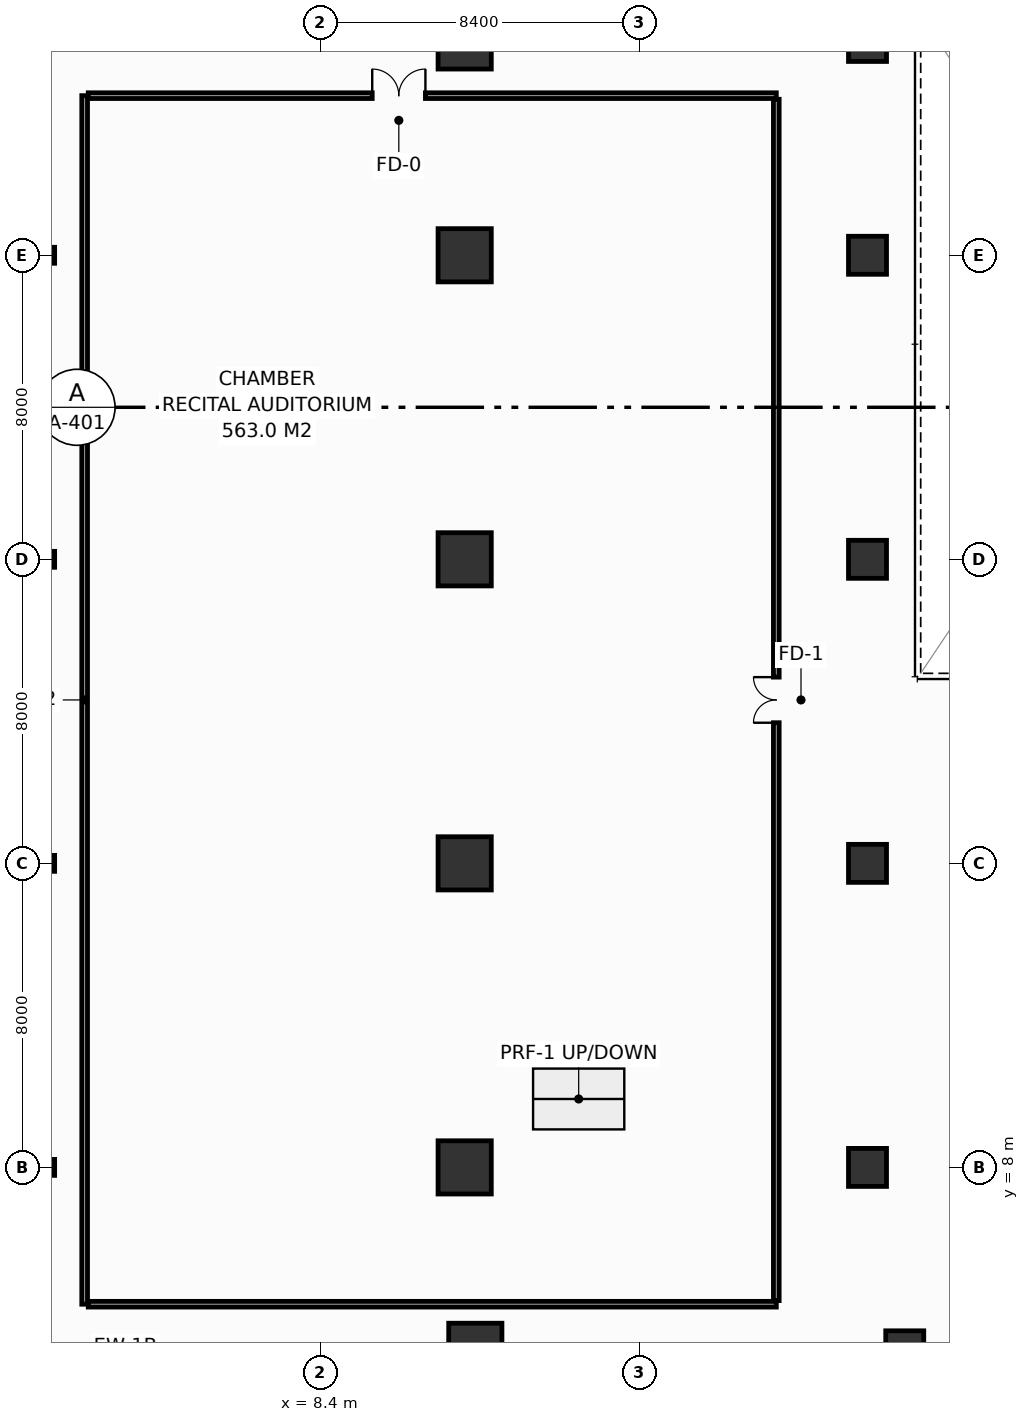
"""IFC4 building model, lengths in metres.
Left out: names, types, materials, properties, quantities, classifications, styles, units other than length and angle.
Written with IfcOpenShell. Run it as: python <this file> out.ifc"""

import sys

from ifc_helpers import new_model, si_unit, direction, frame, frame_2d, origin, origin_2d, place, context, subcontext, project, spatial, rectangle, hollow_rectangle, i_section, extrude, element, fill, save


model = new_model("IFC4")
c1 = context("Model", 3, precision=1e-05, world=origin(), true_north=direction((0.0, 1.0)))
c2 = subcontext(c1, "Body", "Model", "MODEL_VIEW")
j1 = project(units=[si_unit("LENGTHUNIT", "METRE"), si_unit("PLANEANGLEUNIT", "RADIAN")], contexts=[c1])
p1 = place(None, origin())
s1 = spatial("IfcSite", under=j1, at=p1, CompositionType="ELEMENT")
p2 = place(p1, origin())
s2 = spatial("IfcBuilding", under=s1, at=p2, CompositionType="ELEMENT")
p3 = place(p2, frame((0.0, 0.0, 11.4)))
s3 = spatial("IfcBuildingStorey", under=s2, at=p3, CompositionType="ELEMENT", Elevation=11.4)
p4 = place(p3, frame((12.48, 3.2, 0.0), z_axis=(0.0, 0.0, 1.0), x_axis=(1.0, 0.0, 0.0)))
e1 = element("IfcColumn", 1, at=p4, inside=s3, PredefinedType="COLUMN", context=c2, shape_type="SweptSolid", body=[
    extrude(hollow_rectangle(XDim=1.4, YDim=1.4, WallThickness=0.065, at=origin_2d()), origin(), (0.0, 0.0, 1.0), 5.4),
])
p5 = place(p3, frame((23.78, 3.2, 0.0), z_axis=(0.0, 0.0, 1.0), x_axis=(1.0, 0.0, 0.0)))
e2 = element("IfcColumn", 2, at=p5, inside=s3, PredefinedType="COLUMN", context=c2, shape_type="SweptSolid", body=[
    extrude(hollow_rectangle(XDim=1.0, YDim=1.0, WallThickness=0.045, at=origin_2d()), origin(), (0.0, 0.0, 1.0), 5.4),
])
p6 = place(p3, frame((12.2, 8.0, 0.0), z_axis=(0.0, 0.0, 1.0), x_axis=(1.0, 0.0, 0.0)))
e3 = element("IfcColumn", 3, at=p6, inside=s3, PredefinedType="COLUMN", context=c2, shape_type="SweptSolid", body=[
    extrude(hollow_rectangle(XDim=1.4, YDim=1.4, WallThickness=0.065, at=origin_2d()), origin(), (0.0, 0.0, 1.0), 5.4),
])
p7 = place(p3, frame((22.8, 8.0, 0.0), z_axis=(0.0, 0.0, 1.0), x_axis=(1.0, 0.0, 0.0)))
e4 = element("IfcColumn", 4, at=p7, inside=s3, PredefinedType="COLUMN", context=c2, shape_type="SweptSolid", body=[
    extrude(hollow_rectangle(XDim=1.0, YDim=1.0, WallThickness=0.045, at=origin_2d()), origin(), (0.0, 0.0, 1.0), 5.4),
])
p8 = place(p3, frame((12.2, 16.0, 0.0), z_axis=(0.0, 0.0, 1.0), x_axis=(1.0, 0.0, 0.0)))
e5 = element("IfcColumn", 5, at=p8, inside=s3, PredefinedType="COLUMN", context=c2, shape_type="SweptSolid", body=[
    extrude(hollow_rectangle(XDim=1.4, YDim=1.4, WallThickness=0.065, at=origin_2d()), origin(), (0.0, 0.0, 1.0), 5.4),
])
p9 = place(p3, frame((22.8, 16.0, 0.0), z_axis=(0.0, 0.0, 1.0), x_axis=(1.0, 0.0, 0.0)))
e6 = element("IfcColumn", 6, at=p9, inside=s3, PredefinedType="COLUMN", context=c2, shape_type="SweptSolid", body=[
    extrude(hollow_rectangle(XDim=1.0, YDim=1.0, WallThickness=0.045, at=origin_2d()), origin(), (0.0, 0.0, 1.0), 5.4),
])
p10 = place(p3, frame((12.2, 24.0, 0.0), z_axis=(0.0, 0.0, 1.0), x_axis=(1.0, 0.0, 0.0)))
e7 = element("IfcColumn", 7, at=p10, inside=s3, PredefinedType="COLUMN", context=c2, shape_type="SweptSolid", body=[
    extrude(hollow_rectangle(XDim=1.4, YDim=1.4, WallThickness=0.065, at=origin_2d()), origin(), (0.0, 0.0, 1.0), 5.4),
])
p11 = place(p3, frame((22.8, 24.0, 0.0), z_axis=(0.0, 0.0, 1.0), x_axis=(1.0, 0.0, 0.0)))
e8 = element("IfcColumn", 8, at=p11, inside=s3, PredefinedType="COLUMN", context=c2, shape_type="SweptSolid", body=[
    extrude(hollow_rectangle(XDim=1.0, YDim=1.0, WallThickness=0.045, at=origin_2d()), origin(), (0.0, 0.0, 1.0), 5.4),
])
p12 = place(p3, frame((12.2, 32.0, 0.0), z_axis=(0.0, 0.0, 1.0), x_axis=(1.0, 0.0, 0.0)))
e9 = element("IfcColumn", 9, at=p12, inside=s3, PredefinedType="COLUMN", context=c2, shape_type="SweptSolid", body=[
    extrude(hollow_rectangle(XDim=1.4, YDim=1.4, WallThickness=0.065, at=origin_2d()), origin(), (0.0, 0.0, 1.0), 5.4),
])
p13 = place(p3, frame((22.8, 32.0, 0.0), z_axis=(0.0, 0.0, 1.0), x_axis=(1.0, 0.0, 0.0)))
e10 = element("IfcColumn", 10, at=p13, inside=s3, PredefinedType="COLUMN", context=c2, shape_type="SweptSolid", body=[
    extrude(hollow_rectangle(XDim=1.0, YDim=1.0, WallThickness=0.045, at=origin_2d()), origin(), (0.0, 0.0, 1.0), 5.4),
])
p14 = place(p3, frame((12.2, 37.6, 0.0), z_axis=(0.0, 0.0, 1.0), x_axis=(1.0, 0.0, 0.0)))
e11 = element("IfcColumn", 11, at=p14, inside=s3, PredefinedType="COLUMN", context=c2, shape_type="SweptSolid", body=[
    extrude(hollow_rectangle(XDim=1.4, YDim=1.4, WallThickness=0.065, at=origin_2d()), origin(), (0.0, 0.0, 1.0), 5.4),
])
p15 = place(p3, frame((22.8, 37.6, 0.0), z_axis=(0.0, 0.0, 1.0), x_axis=(1.0, 0.0, 0.0)))
e12 = element("IfcColumn", 12, at=p15, inside=s3, PredefinedType="COLUMN", context=c2, shape_type="SweptSolid", body=[
    extrude(hollow_rectangle(XDim=1.0, YDim=1.0, WallThickness=0.045, at=origin_2d()), origin(), (0.0, 0.0, 1.0), 5.4),
])
for number, where, z_axis, x_axis in (
    (13, (1.2, 8.0, 0.0), (0.0, 0.0, 1.0), (1.0, 0.0, 0.0)),
    (14, (1.2, 16.0, 0.0), (0.0, 0.0, 1.0), (1.0, 0.0, 0.0)),
    (15, (1.2, 24.0, 0.0), (0.0, 0.0, 1.0), (1.0, 0.0, 0.0)),
    (16, (1.2, 32.0, 0.0), (0.0, 0.0, 1.0), (1.0, 0.0, 0.0)),
):
    element("IfcColumn", number, at=place(p3, frame(where, z_axis=z_axis, x_axis=x_axis)), inside=s3, PredefinedType="COLUMN", context=c2, shape_type="SweptSolid", body=[
        extrude(i_section(OverallWidth=0.42, OverallDepth=0.42, WebThickness=0.02, FlangeThickness=0.035, FilletRadius=0.022, at=origin_2d()), origin(), (0.0, 0.0, 1.0), 5.4),
    ])
p16 = place(p3, frame((2.2, 4.4, 0.0), z_axis=(0.0, 0.0, 1.0), x_axis=(0.0, 1.0, 0.0)))
e17 = element("IfcWall", 17, at=p16, inside=s3, PredefinedType="PARTITIONING", context=c2, shape_type="SweptSolid", body=[
    extrude(rectangle(XDim=31.8, YDim=0.15, at=frame_2d((15.9, 0.0))), origin(), (0.0, 0.0, 1.0), 4.185),
])
p17 = place(p3, frame((2.295, 4.4, 0.0), z_axis=(0.0, 0.0, 1.0), x_axis=(1.0, 0.0, 0.0)))
e18 = element("IfcWall", 18, at=p17, inside=s3, PredefinedType="PARTITIONING", context=c2, shape_type="SweptSolid", body=[
    extrude(rectangle(XDim=18.105, YDim=0.15, at=frame_2d((9.052, 0.0))), origin(), (0.0, 0.0, 1.0), 4.185),
])
p18 = place(p3, frame((2.295, 36.2, 0.0), z_axis=(0.0, 0.0, 1.0), x_axis=(1.0, 0.0, 0.0)))
e19 = element("IfcWall", 19, at=p18, inside=s3, PredefinedType="PARTITIONING", context=c2, shape_type="SweptSolid", body=[
    extrude(rectangle(XDim=18.105, YDim=0.15, at=frame_2d((9.052, 0.0))), origin(), (0.0, 0.0, 1.0), 4.185),
])
p19 = place(p18, frame((7.472, 0.0, 0.0)))
e20 = element("IfcOpeningElement", 20, at=p19, cuts=e19, PredefinedType="OPENING", context=c2, shape_type="SweptSolid", body=[
    extrude(rectangle(XDim=1.4, YDim=2.2, at=frame_2d((0.7, 1.1))), frame((0.0, 0.085, 0.0), z_axis=(0.0, -1.0, 0.0), x_axis=(1.0, 0.0, 0.0)), (0.0, 0.0, 1.0), 0.17),
])
p20 = place(p3, frame((20.4, 4.495, 0.0), z_axis=(0.0, 0.0, 1.0), x_axis=(0.0, 1.0, 0.0)))
e21 = element("IfcWall", 21, at=p20, inside=s3, PredefinedType="PARTITIONING", context=c2, shape_type="SweptSolid", body=[
    extrude(rectangle(XDim=31.61, YDim=0.15, at=frame_2d((15.805, 0.0))), origin(), (0.0, 0.0, 1.0), 4.185),
])
p21 = place(p20, frame((15.205, 0.0, 0.0)))
e22 = element("IfcOpeningElement", 22, at=p21, cuts=e21, PredefinedType="OPENING", context=c2, shape_type="SweptSolid", body=[
    extrude(rectangle(XDim=1.2, YDim=2.15, at=frame_2d((0.6, 1.075))), frame((0.0, 0.085, 0.0), z_axis=(0.0, -1.0, 0.0), x_axis=(1.0, 0.0, 0.0)), (0.0, 0.0, 1.0), 0.17),
])
p22 = place(p19, origin())
e23 = element("IfcDoor", 23, at=p22, inside=s3, OperationType="DOUBLE_DOOR_SINGLE_SWING", PredefinedType="DOOR", context=c2, shape_type="SweptSolid", body=[
    extrude(rectangle(XDim=1.4, YDim=2.2, at=frame_2d((0.7, 1.1))), frame((0.0, 0.025, 0.0), z_axis=(0.0, -1.0, 0.0), x_axis=(1.0, 0.0, 0.0)), (0.0, 0.0, 1.0), 0.05),
])
fill(e20, e23)
p23 = place(p21, origin())
e24 = element("IfcDoor", 24, at=p23, inside=s3, OperationType="DOUBLE_DOOR_SINGLE_SWING", PredefinedType="DOOR", context=c2, shape_type="SweptSolid", body=[
    extrude(rectangle(XDim=1.2, YDim=2.15, at=frame_2d((0.6, 1.075))), frame((0.0, 0.025, 0.0), z_axis=(0.0, -1.0, 0.0), x_axis=(1.0, 0.0, 0.0)), (0.0, 0.0, 1.0), 0.05),
])
fill(e22, e24)
save(model, sys.argv[1])
